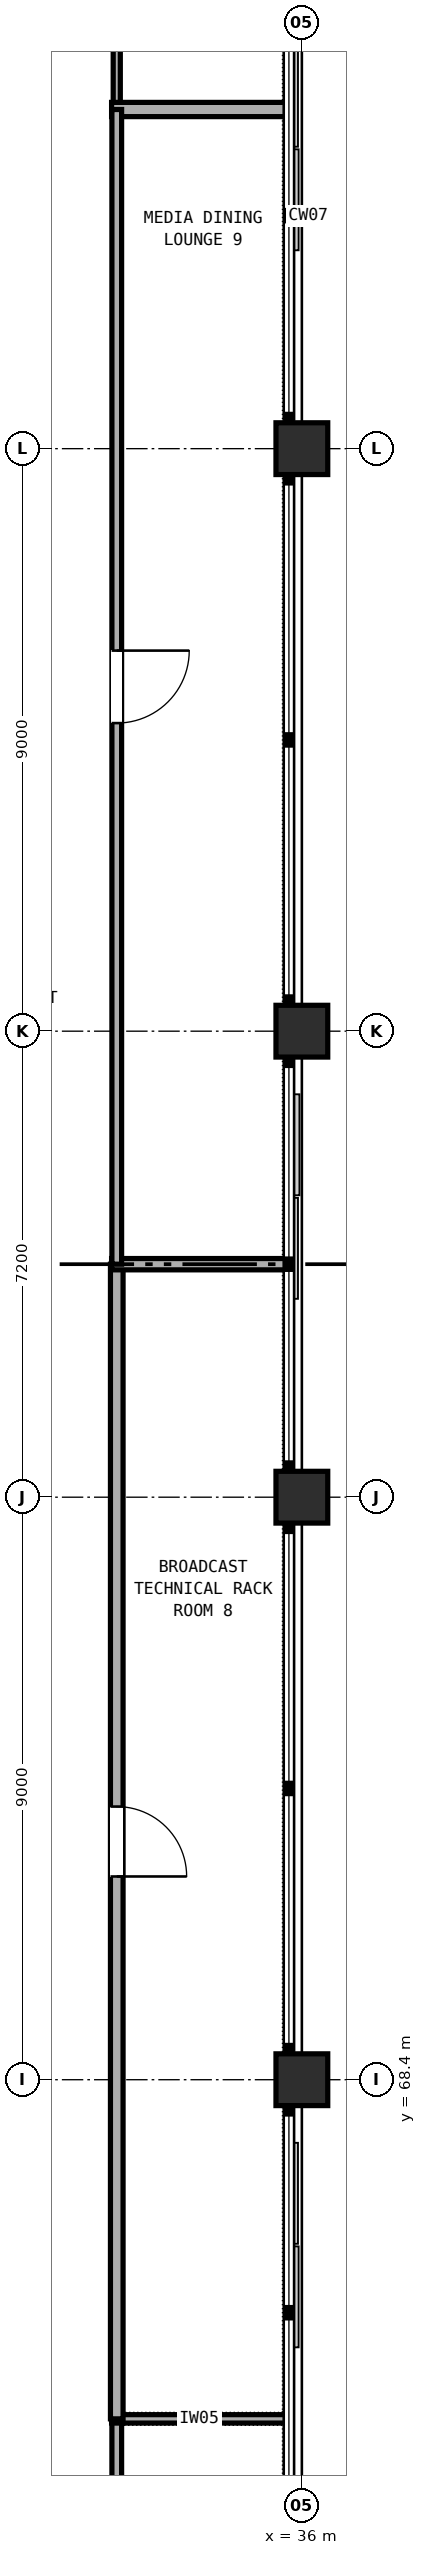
"""IFC4 building model, lengths in metres.
Left out: names, types, materials, properties, quantities, classifications, styles, units other than length and angle.
Written with IfcOpenShell. Run it as: python <this file> out.ifc"""

import sys

from ifc_helpers import new_model, si_unit, direction, frame, frame_2d, origin, origin_2d, place, context, subcontext, project, spatial, rectangle, extrude, element, fill, save


model = new_model("IFC4")
c1 = context("Model", 3, precision=1e-05, world=origin(), true_north=direction((0.0, 1.0)))
c2 = subcontext(c1, "Body", "Model", "MODEL_VIEW")
j1 = project(units=[si_unit("LENGTHUNIT", "METRE"), si_unit("PLANEANGLEUNIT", "RADIAN")], contexts=[c1])
p1 = place(None, origin())
s1 = spatial("IfcSite", under=j1, at=p1, CompositionType="ELEMENT")
p2 = place(p1, origin())
s2 = spatial("IfcBuilding", under=s1, at=p2, CompositionType="ELEMENT")
p3 = place(p2, frame((0.0, 0.0, 24.0)))
s3 = spatial("IfcBuildingStorey", under=s2, at=p3, CompositionType="ELEMENT", Elevation=24.0)
for number, where, z_axis, x_axis in (
    (1, (36.0, 68.4, 0.0), (0.0, 0.0, 1.0), (1.0, 0.0, 0.0)),
    (2, (36.0, 77.4, 0.0), (0.0, 0.0, 1.0), (1.0, 0.0, 0.0)),
    (3, (36.0, 84.6, 0.0), (0.0, 0.0, 1.0), (1.0, 0.0, 0.0)),
    (4, (36.0, 93.6, 0.0), (0.0, 0.0, 1.0), (1.0, 0.0, 0.0)),
):
    element("IfcColumn", number, at=place(p3, frame(where, z_axis=z_axis, x_axis=x_axis)), inside=s3, PredefinedType="COLUMN", context=c2, shape_type="SweptSolid", body=[
        extrude(rectangle(XDim=0.8, YDim=0.8, at=origin_2d()), origin(), (0.0, 0.0, 1.0), 4.8),
    ])
p4 = place(p3, frame((33.14, 63.16, 0.0), z_axis=(0.0, 0.0, 1.0), x_axis=(0.0, -1.0, 0.0)))
e5 = element("IfcWall", 5, at=p4, inside=s3, PredefinedType="PARTITIONING", context=c2, shape_type="SweptSolid", body=[
    extrude(rectangle(XDim=17.96, YDim=0.15, at=frame_2d((8.98, 0.0))), origin(), (0.0, 0.0, 1.0), 3.56),
])
p5 = place(p4, frame((8.505, 0.0, 0.0)))
e6 = element("IfcOpeningElement", 6, at=p5, cuts=e5, PredefinedType="OPENING", context=c2, shape_type="SweptSolid", body=[
    extrude(rectangle(XDim=0.95, YDim=2.18, at=frame_2d((0.475, 1.09))), frame((0.0, 0.085, 0.0), z_axis=(0.0, -1.0, 0.0), x_axis=(1.0, 0.0, 0.0)), (0.0, 0.0, 1.0), 0.17),
])
p6 = place(p3, frame((33.06, 63.16, 0.0), z_axis=(0.0, 0.0, 1.0), x_axis=(1.0, 0.0, 0.0)))
e7 = element("IfcWall", 7, at=p6, inside=s3, PredefinedType="PARTITIONING", context=c2, shape_type="SweptSolid", body=[
    extrude(rectangle(XDim=2.707, YDim=0.13, at=frame_2d((1.354, 0.0))), origin(), (0.0, 0.0, 1.0), 3.56),
])
p7 = place(p3, frame((33.14, 116.8, 0.0), z_axis=(0.0, 0.0, 1.0), x_axis=(0.0, -1.0, 0.0)))
e8 = element("IfcWall", 8, at=p7, inside=s3, PredefinedType="PARTITIONING", context=c2, shape_type="SweptSolid", body=[
    extrude(rectangle(XDim=17.96, YDim=0.11, at=frame_2d((8.98, 0.0))), origin(), (0.0, 0.0, 1.0), 3.56),
])
p8 = place(p7, frame((8.47, 0.0, 0.0)))
e9 = element("IfcOpeningElement", 9, at=p8, cuts=e8, PredefinedType="OPENING", context=c2, shape_type="SweptSolid", body=[
    extrude(rectangle(XDim=1.02, YDim=2.16, at=frame_2d((0.51, 1.08))), frame((0.0, 0.065, 0.0), z_axis=(0.0, -1.0, 0.0), x_axis=(1.0, 0.0, 0.0)), (0.0, 0.0, 1.0), 0.13),
])
p9 = place(p3, frame((35.767, 98.84, 0.0), z_axis=(0.0, 0.0, 1.0), x_axis=(-1.0, 0.0, 0.0)))
e10 = element("IfcWall", 10, at=p9, inside=s3, PredefinedType="PARTITIONING", context=c2, shape_type="SweptSolid", body=[
    extrude(rectangle(XDim=2.707, YDim=0.22, at=frame_2d((1.354, 0.0))), origin(), (0.0, 0.0, 1.0), 3.56),
])
p10 = place(p3, frame((33.14, 81.0, 0.0), z_axis=(0.0, 0.0, 1.0), x_axis=(0.0, -1.0, 0.0)))
e11 = element("IfcWall", 11, at=p10, inside=s3, PredefinedType="PARTITIONING", context=c2, shape_type="SweptSolid", body=[
    extrude(rectangle(XDim=17.84, YDim=0.195, at=frame_2d((8.92, 0.0))), origin(), (0.0, 0.0, 1.0), 3.56),
])
p11 = place(p10, frame((8.38, 0.0, 0.0)))
e12 = element("IfcOpeningElement", 12, at=p11, cuts=e11, PredefinedType="OPENING", context=c2, shape_type="SweptSolid", body=[
    extrude(rectangle(XDim=1.08, YDim=2.18, at=frame_2d((0.54, 1.09))), frame((0.0, 0.107, 0.0), z_axis=(0.0, -1.0, 0.0), x_axis=(1.0, 0.0, 0.0)), (0.0, 0.0, 1.0), 0.215),
])
p12 = place(p3, frame((33.06, 81.0, 0.0), z_axis=(0.0, 0.0, 1.0), x_axis=(1.0, 0.0, 0.0)))
e13 = element("IfcWall", 13, at=p12, inside=s3, PredefinedType="PARTITIONING", context=c2, shape_type="SweptSolid", body=[
    extrude(rectangle(XDim=2.7, YDim=0.175, at=frame_2d((1.35, 0.0))), origin(), (0.0, 0.0, 1.0), 3.56),
])
p13 = place(p3, frame((33.14, 98.84, 0.0), z_axis=(0.0, 0.0, 1.0), x_axis=(0.0, -1.0, 0.0)))
e14 = element("IfcWall", 14, at=p13, inside=s3, PredefinedType="PARTITIONING", context=c2, shape_type="SweptSolid", body=[
    extrude(rectangle(XDim=17.84, YDim=0.15, at=frame_2d((8.92, 0.0))), origin(), (0.0, 0.0, 1.0), 3.56),
])
p14 = place(p13, frame((8.36, 0.0, 0.0)))
e15 = element("IfcOpeningElement", 15, at=p14, cuts=e14, PredefinedType="OPENING", context=c2, shape_type="SweptSolid", body=[
    extrude(rectangle(XDim=1.12, YDim=2.22, at=frame_2d((0.56, 1.11))), frame((0.0, 0.085, 0.0), z_axis=(0.0, -1.0, 0.0), x_axis=(1.0, 0.0, 0.0)), (0.0, 0.0, 1.0), 0.17),
])
p15 = place(p11, origin())
e16 = element("IfcDoor", 16, at=p15, inside=s3, OperationType="SINGLE_SWING_RIGHT", PredefinedType="DOOR", context=c2, shape_type="SweptSolid", body=[
    extrude(rectangle(XDim=1.08, YDim=2.18, at=frame_2d((0.54, 1.09))), frame((0.0, 0.025, 0.0), z_axis=(0.0, -1.0, 0.0), x_axis=(1.0, 0.0, 0.0)), (0.0, 0.0, 1.0), 0.05),
])
fill(e12, e16)
p16 = place(p14, origin())
e17 = element("IfcDoor", 17, at=p16, inside=s3, OperationType="SINGLE_SWING_LEFT", PredefinedType="DOOR", context=c2, shape_type="SweptSolid", body=[
    extrude(rectangle(XDim=1.12, YDim=2.22, at=frame_2d((0.56, 1.11))), frame((0.0, 0.025, 0.0), z_axis=(0.0, -1.0, 0.0), x_axis=(1.0, 0.0, 0.0)), (0.0, 0.0, 1.0), 0.05),
])
fill(e15, e17)
save(model, sys.argv[1])
